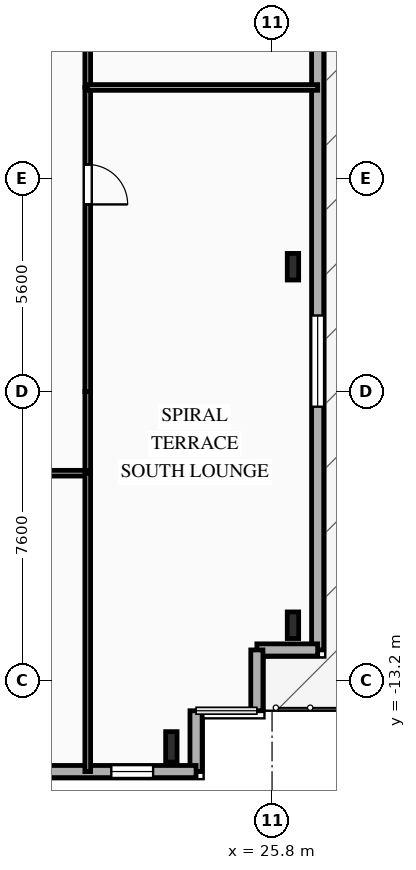
"""IFC4 building model, lengths in metres.
Left out: names, types, materials, properties, quantities, classifications, styles, units other than length and angle.
Written with IfcOpenShell. Run it as: python <this file> out.ifc"""

import sys

from ifc_helpers import new_model, si_unit, direction, frame, frame_2d, origin, origin_2d, place, context, subcontext, project, spatial, rectangle, i_section, extrude, element, fill, save


model = new_model("IFC4")
c1 = context("Model", 3, precision=1e-05, world=origin(), true_north=direction((0.0, 1.0)))
c2 = subcontext(c1, "Body", "Model", "MODEL_VIEW")
j1 = project(units=[si_unit("LENGTHUNIT", "METRE"), si_unit("PLANEANGLEUNIT", "RADIAN")], contexts=[c1])
p1 = place(None, origin())
s1 = spatial("IfcSite", under=j1, at=p1, CompositionType="ELEMENT")
p2 = place(p1, origin())
s2 = spatial("IfcBuilding", under=s1, at=p2, CompositionType="ELEMENT")
p3 = place(p2, frame((0.0, 0.0, 131.0)))
s3 = spatial("IfcBuildingStorey", under=s2, at=p3, CompositionType="ELEMENT", Elevation=131.0)
p4 = place(p3, frame((23.15, -14.95, 0.0), z_axis=(0.0, 0.0, 1.0), x_axis=(1.0, 0.0, 0.0)))
e1 = element("IfcColumn", 1, at=p4, inside=s3, PredefinedType="COLUMN", context=c2, shape_type="SweptSolid", body=[
    extrude(i_section(OverallWidth=0.3, OverallDepth=0.8, WebThickness=0.018, FlangeThickness=0.033, FilletRadius=0.03, at=origin_2d()), origin(), (0.0, 0.0, 1.0), 3.35),
])
for number, where, z_axis, x_axis in (
    (2, (26.35, -11.75, 0.0), (0.0, 0.0, 1.0), (1.0, 0.0, 0.0)),
    (3, (26.35, -2.317, 0.0), (0.0, 0.0, 1.0), (1.0, 0.0, 0.0)),
):
    element("IfcColumn", number, at=place(p3, frame(where, z_axis=z_axis, x_axis=x_axis)), inside=s3, PredefinedType="COLUMN", context=c2, shape_type="SweptSolid", body=[
        extrude(i_section(OverallWidth=0.3, OverallDepth=0.7, WebThickness=0.017, FlangeThickness=0.032, FilletRadius=0.027, at=origin_2d()), origin(), (0.0, 0.0, 1.0), 3.35),
    ])
p5 = place(p3, frame((27.0, 17.2, 0.0), z_axis=(0.0, 0.0, 1.0), x_axis=(0.0, -1.0, 0.0)))
e4 = element("IfcWall", 4, at=p5, inside=s3, PredefinedType="SOLIDWALL", context=c2, shape_type="SweptSolid", body=[
    extrude(rectangle(XDim=29.6, YDim=0.32, at=frame_2d((14.8, 0.0))), origin(), (0.0, 0.0, 1.0), 3.04),
])
p6 = place(p5, frame((6.44, 0.0, 0.85)))
e5 = element("IfcOpeningElement", 5, at=p6, cuts=e4, PredefinedType="OPENING", context=c2, shape_type="SweptSolid", body=[
    extrude(rectangle(XDim=2.4, YDim=1.95, at=frame_2d((1.2, 0.975))), frame((0.0, 0.17, 0.0), z_axis=(0.0, -1.0, 0.0), x_axis=(1.0, 0.0, 0.0)), (0.0, 0.0, 1.0), 0.34),
])
p7 = place(p5, frame((20.8, 0.0, 0.85)))
e6 = element("IfcOpeningElement", 6, at=p7, cuts=e4, PredefinedType="OPENING", context=c2, shape_type="SweptSolid", body=[
    extrude(rectangle(XDim=2.4, YDim=1.95, at=frame_2d((1.2, 0.975))), frame((0.0, 0.17, 0.0), z_axis=(0.0, -1.0, 0.0), x_axis=(1.0, 0.0, 0.0)), (0.0, 0.0, 1.0), 0.34),
])
for number, where, z_axis, x_axis in (
    (7, (27.0, -12.4, 0.0), (0.0, 0.0, 1.0), (-1.0, 0.0, 0.0)),
    (8, (25.4, -12.4, 0.0), (0.0, 0.0, 1.0), (0.0, -1.0, 0.0)),
    (9, (23.8, -14.0, 0.0), (0.0, 0.0, 1.0), (0.0, -1.0, 0.0)),
):
    element("IfcWall", number, at=place(p3, frame(where, z_axis=z_axis, x_axis=x_axis)), inside=s3, PredefinedType="SOLIDWALL", context=c2, shape_type="SweptSolid", body=[
        extrude(rectangle(XDim=1.6, YDim=0.32, at=frame_2d((0.8, 0.0))), origin(), (0.0, 0.0, 1.0), 3.04),
    ])
p8 = place(p3, frame((23.8, -15.6, 0.0), z_axis=(0.0, 0.0, 1.0), x_axis=(-1.0, 0.0, 0.0)))
e10 = element("IfcWall", 10, at=p8, inside=s3, PredefinedType="SOLIDWALL", context=c2, shape_type="SweptSolid", body=[
    extrude(rectangle(XDim=49.6, YDim=0.32, at=frame_2d((24.8, 0.0))), origin(), (0.0, 0.0, 1.0), 3.04),
])
p9 = place(p8, frame((1.13, 0.0, 0.85)))
e11 = element("IfcOpeningElement", 11, at=p9, cuts=e10, PredefinedType="OPENING", context=c2, shape_type="SweptSolid", body=[
    extrude(rectangle(XDim=1.1, YDim=1.85, at=frame_2d((0.55, 0.925))), frame((0.0, 0.17, 0.0), z_axis=(0.0, -1.0, 0.0), x_axis=(1.0, 0.0, 0.0)), (0.0, 0.0, 1.0), 0.34),
])
p10 = place(p8, frame((6.255, 0.0, 0.85)))
e12 = element("IfcOpeningElement", 12, at=p10, cuts=e10, PredefinedType="OPENING", context=c2, shape_type="SweptSolid", body=[
    extrude(rectangle(XDim=1.65, YDim=1.85, at=frame_2d((0.825, 0.925))), frame((0.0, 0.17, 0.0), z_axis=(0.0, -1.0, 0.0), x_axis=(1.0, 0.0, 0.0)), (0.0, 0.0, 1.0), 0.34),
])
p11 = place(p8, frame((14.38, 0.0, 0.85)))
e13 = element("IfcOpeningElement", 13, at=p11, cuts=e10, PredefinedType="OPENING", context=c2, shape_type="SweptSolid", body=[
    extrude(rectangle(XDim=2.2, YDim=1.85, at=frame_2d((1.1, 0.925))), frame((0.0, 0.17, 0.0), z_axis=(0.0, -1.0, 0.0), x_axis=(1.0, 0.0, 0.0)), (0.0, 0.0, 1.0), 0.34),
])
p12 = place(p8, frame((21.888, 0.0, 0.85)))
e14 = element("IfcOpeningElement", 14, at=p12, cuts=e10, PredefinedType="OPENING", context=c2, shape_type="SweptSolid", body=[
    extrude(rectangle(XDim=2.2, YDim=1.85, at=frame_2d((1.1, 0.925))), frame((0.0, 0.17, 0.0), z_axis=(0.0, -1.0, 0.0), x_axis=(1.0, 0.0, 0.0)), (0.0, 0.0, 1.0), 0.34),
])
p13 = place(p8, frame((30.236, 0.0, 0.85)))
e15 = element("IfcOpeningElement", 15, at=p13, cuts=e10, PredefinedType="OPENING", context=c2, shape_type="SweptSolid", body=[
    extrude(rectangle(XDim=2.2, YDim=1.85, at=frame_2d((1.1, 0.925))), frame((0.0, 0.17, 0.0), z_axis=(0.0, -1.0, 0.0), x_axis=(1.0, 0.0, 0.0)), (0.0, 0.0, 1.0), 0.34),
])
p14 = place(p8, frame((38.897, 0.0, 0.85)))
e16 = element("IfcOpeningElement", 16, at=p14, cuts=e10, PredefinedType="OPENING", context=c2, shape_type="SweptSolid", body=[
    extrude(rectangle(XDim=1.65, YDim=1.85, at=frame_2d((0.825, 0.925))), frame((0.0, 0.17, 0.0), z_axis=(0.0, -1.0, 0.0), x_axis=(1.0, 0.0, 0.0)), (0.0, 0.0, 1.0), 0.34),
])
p15 = place(p8, frame((46.175, 0.0, 0.85)))
e17 = element("IfcOpeningElement", 17, at=p15, cuts=e10, PredefinedType="OPENING", context=c2, shape_type="SweptSolid", body=[
    extrude(rectangle(XDim=1.65, YDim=1.85, at=frame_2d((0.825, 0.925))), frame((0.0, 0.17, 0.0), z_axis=(0.0, -1.0, 0.0), x_axis=(1.0, 0.0, 0.0)), (0.0, 0.0, 1.0), 0.34),
])
p16 = place(p3, frame((20.95, -5.6, 0.0), z_axis=(0.0, 0.0, 1.0), x_axis=(0.0, -1.0, 0.0)))
e18 = element("IfcWall", 18, at=p16, inside=s3, PredefinedType="PARTITIONING", context=c2, shape_type="SweptSolid", body=[
    extrude(rectangle(XDim=2.15, YDim=0.15, at=frame_2d((1.075, 0.0))), origin(), (0.0, 0.0, 1.0), 3.04),
])
p17 = place(p3, frame((20.95, -7.75, 0.0), z_axis=(0.0, 0.0, 1.0), x_axis=(-1.0, 0.0, 0.0)))
e19 = element("IfcWall", 19, at=p17, inside=s3, PredefinedType="PARTITIONING", context=c2, shape_type="SweptSolid", body=[
    extrude(rectangle(XDim=8.38, YDim=0.15, at=frame_2d((4.19, 0.0))), origin(), (0.0, 0.0, 1.0), 3.04),
])
p18 = place(p17, frame((5.979, 0.0, 0.0)))
e20 = element("IfcOpeningElement", 20, at=p18, cuts=e19, PredefinedType="OPENING", context=c2, shape_type="SweptSolid", body=[
    extrude(rectangle(XDim=1.05, YDim=2.15, at=frame_2d((0.525, 1.075))), frame((0.0, 0.085, 0.0), z_axis=(0.0, -1.0, 0.0), x_axis=(1.0, 0.0, 0.0)), (0.0, 0.0, 1.0), 0.17),
])
p19 = place(p3, frame((20.95, 2.4, 0.0), z_axis=(0.0, 0.0, 1.0), x_axis=(0.0, -1.0, 0.0)))
e21 = element("IfcWall", 21, at=p19, inside=s3, PredefinedType="PARTITIONING", context=c2, shape_type="SweptSolid", body=[
    extrude(rectangle(XDim=8.0, YDim=0.15, at=frame_2d((4.0, 0.0))), origin(), (0.0, 0.0, 1.0), 3.04),
])
p20 = place(p19, frame((2.028, 0.0, 0.0)))
e22 = element("IfcOpeningElement", 22, at=p20, cuts=e21, PredefinedType="OPENING", context=c2, shape_type="SweptSolid", body=[
    extrude(rectangle(XDim=1.05, YDim=2.15, at=frame_2d((0.525, 1.075))), frame((0.0, 0.085, 0.0), z_axis=(0.0, -1.0, 0.0), x_axis=(1.0, 0.0, 0.0)), (0.0, 0.0, 1.0), 0.17),
])
p21 = place(p3, frame((20.95, 8.5, 0.0), z_axis=(0.0, 0.0, 1.0), x_axis=(0.0, -1.0, 0.0)))
e23 = element("IfcWall", 23, at=p21, inside=s3, PredefinedType="PARTITIONING", context=c2, shape_type="SweptSolid", body=[
    extrude(rectangle(XDim=6.1, YDim=0.15, at=frame_2d((3.05, 0.0))), origin(), (0.0, 0.0, 1.0), 3.04),
])
p22 = place(p21, frame((3.984, 0.0, 0.0)))
e24 = element("IfcOpeningElement", 24, at=p22, cuts=e23, PredefinedType="OPENING", context=c2, shape_type="SweptSolid", body=[
    extrude(rectangle(XDim=1.05, YDim=2.15, at=frame_2d((0.525, 1.075))), frame((0.0, 0.085, 0.0), z_axis=(0.0, -1.0, 0.0), x_axis=(1.0, 0.0, 0.0)), (0.0, 0.0, 1.0), 0.17),
])
p23 = place(p3, frame((20.95, 2.4, 0.0), z_axis=(0.0, 0.0, 1.0), x_axis=(1.0, 0.0, 0.0)))
e25 = element("IfcWall", 25, at=p23, inside=s3, PredefinedType="PARTITIONING", context=c2, shape_type="SweptSolid", body=[
    extrude(rectangle(XDim=6.05, YDim=0.15, at=frame_2d((3.025, 0.0))), origin(), (0.0, 0.0, 1.0), 3.04),
])
p24 = place(p3, frame((20.95, -15.6, 0.0), z_axis=(0.0, 0.0, 1.0), x_axis=(0.0, 1.0, 0.0)))
e26 = element("IfcWall", 26, at=p24, inside=s3, PredefinedType="PARTITIONING", context=c2, shape_type="SweptSolid", body=[
    extrude(rectangle(XDim=7.85, YDim=0.15, at=frame_2d((3.925, 0.0))), origin(), (0.0, 0.0, 1.0), 3.04),
])
p25 = place(p7, origin())
e27 = element("IfcWindow", 27, at=p25, inside=s3, PartitioningType="SINGLE_PANEL", PredefinedType="WINDOW", context=c2, shape_type="SweptSolid", body=[
    extrude(rectangle(XDim=2.4, YDim=1.95, at=frame_2d((1.2, 0.975))), frame((0.0, 0.03, 0.0), z_axis=(0.0, -1.0, 0.0), x_axis=(1.0, 0.0, 0.0)), (0.0, 0.0, 1.0), 0.06),
])
fill(e6, e27)
p26 = place(p9, origin())
e28 = element("IfcWindow", 28, at=p26, inside=s3, PartitioningType="SINGLE_PANEL", PredefinedType="WINDOW", context=c2, shape_type="SweptSolid", body=[
    extrude(rectangle(XDim=1.1, YDim=1.85, at=frame_2d((0.55, 0.925))), frame((0.0, 0.03, 0.0), z_axis=(0.0, -1.0, 0.0), x_axis=(1.0, 0.0, 0.0)), (0.0, 0.0, 1.0), 0.06),
])
fill(e11, e28)
p27 = place(p20, origin())
e29 = element("IfcDoor", 29, at=p27, inside=s3, OperationType="SINGLE_SWING_RIGHT", PredefinedType="DOOR", context=c2, shape_type="SweptSolid", body=[
    extrude(rectangle(XDim=1.05, YDim=2.15, at=frame_2d((0.525, 1.075))), frame((0.0, 0.025, 0.0), z_axis=(0.0, -1.0, 0.0), x_axis=(1.0, 0.0, 0.0)), (0.0, 0.0, 1.0), 0.05),
])
fill(e22, e29)
save(model, sys.argv[1])
